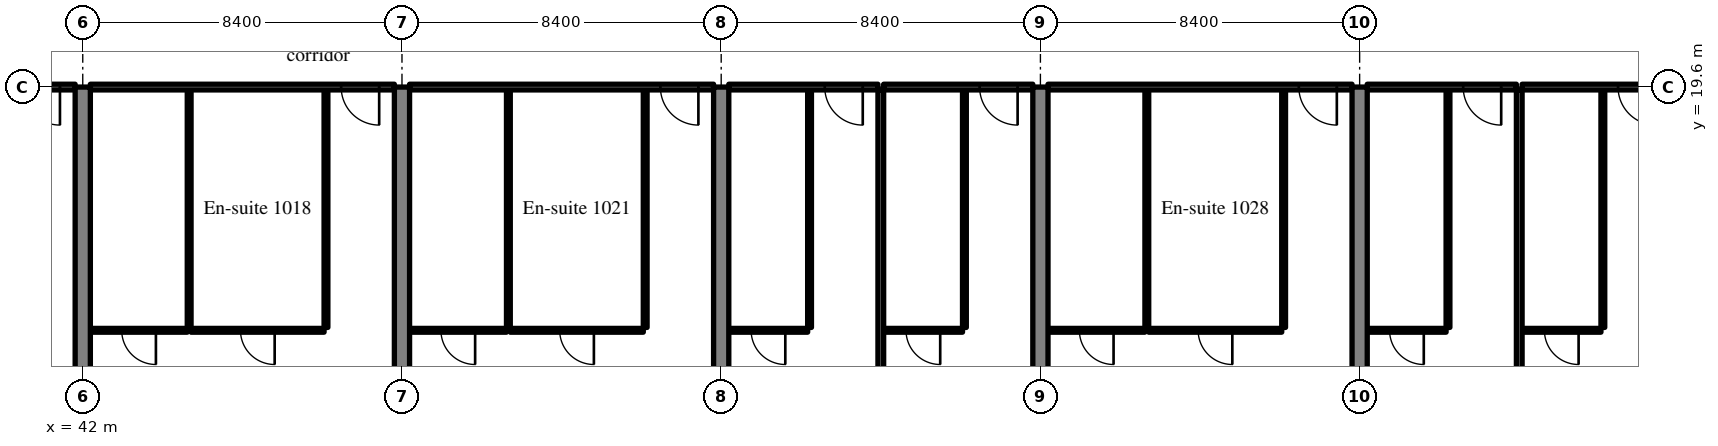
"""IFC4 building model, lengths in metres.
Left out: names, types, materials, properties, quantities, classifications, styles, units other than length and angle.
Written with IfcOpenShell. Run it as: python <this file> out.ifc"""

import sys

from ifc_helpers import new_model, si_unit, direction, frame, frame_2d, origin, place, context, subcontext, project, spatial, rectangle, extrude, source, transform, mapped, element, fill, save


model = new_model("IFC4")
c1 = context("Model", 3, precision=1e-05, world=origin(), true_north=direction((0.0, 1.0)))
c2 = subcontext(c1, "Body", "Model", "MODEL_VIEW")
j1 = project(units=[si_unit("LENGTHUNIT", "METRE"), si_unit("PLANEANGLEUNIT", "RADIAN")], contexts=[c1])
p1 = place(None, origin())
s1 = spatial("IfcSite", under=j1, at=p1, CompositionType="ELEMENT")
p2 = place(p1, origin())
s2 = spatial("IfcBuilding", under=s1, at=p2, CompositionType="ELEMENT")
p3 = place(p2, frame((0.0, 0.0, 46.8)))
s3 = spatial("IfcBuildingStorey", under=s2, at=p3, CompositionType="ELEMENT", Elevation=46.8)
m1 = source(origin(), c2, "Body", "SweptSolid", [
    extrude(rectangle(XDim=19.6, YDim=0.4, at=frame_2d((9.8, 0.0))), origin(), (0.0, 0.0, 1.0), 3.52),
])
p4 = place(p3, frame((42.0, 0.0, 0.0), z_axis=(0.0, 0.0, 1.0), x_axis=(0.0, 1.0, 0.0)))
e1 = element("IfcWall", 1, at=p4, inside=s3, PredefinedType="SHEAR", context=c2, shape_type="MappedRepresentation", body=[
    mapped(m1, transform((0.0, 0.0, 0.0), scale=1.0)),
])
m2 = source(origin(), c2, "Body", "SweptSolid", [
    extrude(rectangle(XDim=18.6, YDim=0.4, at=frame_2d((9.3, 0.0))), origin(), (0.0, 0.0, 1.0), 3.52),
])
p5 = place(p3, frame((50.4, 1.0, 0.0), z_axis=(0.0, 0.0, 1.0), x_axis=(0.0, 1.0, 0.0)))
e2 = element("IfcWall", 2, at=p5, inside=s3, PredefinedType="SHEAR", context=c2, shape_type="MappedRepresentation", body=[
    mapped(m2, transform((0.0, 0.0, 0.0), scale=1.0)),
])
for number, where, z_axis, x_axis in (
    (3, (58.8, 0.0, 0.0), (0.0, 0.0, 1.0), (0.0, 1.0, 0.0)),
    (4, (67.2, 0.0, 0.0), (0.0, 0.0, 1.0), (0.0, 1.0, 0.0)),
    (5, (75.6, 0.0, 0.0), (0.0, 0.0, 1.0), (0.0, 1.0, 0.0)),
):
    element("IfcWall", number, at=place(p3, frame(where, z_axis=z_axis, x_axis=x_axis)), inside=s3, PredefinedType="SHEAR", context=c2, shape_type="MappedRepresentation", body=[
        mapped(m1, transform((0.0, 0.0, 0.0), scale=1.0)),
    ])
m3 = source(origin(), c2, "Body", "SweptSolid", [
    extrude(rectangle(XDim=8.0, YDim=0.15, at=frame_2d((4.0, 0.0))), origin(), (0.0, 0.0, 1.0), 2.82),
])
p6 = place(p3, frame((33.8, 19.6, 0.0), z_axis=(0.0, 0.0, 1.0), x_axis=(1.0, 0.0, 0.0)))
e6 = element("IfcWall", 6, at=p6, inside=s3, PredefinedType="PARTITIONING", context=c2, shape_type="MappedRepresentation", body=[
    mapped(m3, transform((0.0, 0.0, 0.0), scale=1.0)),
])
m4 = source(origin(), c2, "Body", "SweptSolid", [
    extrude(rectangle(XDim=1.0, YDim=2.1, at=frame_2d((0.5, 1.05))), frame((0.0, 0.085, 0.0), z_axis=(0.0, -1.0, 0.0), x_axis=(1.0, 0.0, 0.0)), (0.0, 0.0, 1.0), 0.17),
])
p7 = place(p6, frame((6.6, 0.0, 0.0)))
e7 = element("IfcOpeningElement", 7, at=p7, cuts=e6, PredefinedType="OPENING", context=c2, shape_type="MappedRepresentation", body=[
    mapped(m4, transform((0.0, 0.0, 0.0), scale=1.0)),
])
m5 = source(origin(), c2, "Body", "SweptSolid", [
    extrude(rectangle(XDim=6.25, YDim=0.1, at=frame_2d((3.125, 0.0))), origin(), (0.0, 0.0, 1.0), 3.52),
])
for number, where, z_axis, x_axis in (
    (8, (48.4, 13.275, 0.0), (0.0, 0.0, 1.0), (0.0, 1.0, 0.0)),
    (9, (44.8, 13.275, 0.0), (0.0, 0.0, 1.0), (0.0, 1.0, 0.0)),
):
    element("IfcWall", number, at=place(p3, frame(where, z_axis=z_axis, x_axis=x_axis)), inside=s3, PredefinedType="PARTITIONING", context=c2, shape_type="MappedRepresentation", body=[
        mapped(m5, transform((0.0, 0.0, 0.0), scale=1.0)),
    ])
m6 = source(origin(), c2, "Body", "SweptSolid", [
    extrude(rectangle(XDim=3.5, YDim=0.1, at=frame_2d((1.75, 0.0))), origin(), (0.0, 0.0, 1.0), 3.52),
])
p8 = place(p3, frame((44.85, 13.2, 0.0), z_axis=(0.0, 0.0, 1.0), x_axis=(1.0, 0.0, 0.0)))
e10 = element("IfcWall", 10, at=p8, inside=s3, PredefinedType="PARTITIONING", context=c2, shape_type="MappedRepresentation", body=[
    mapped(m6, transform((0.0, 0.0, 0.0), scale=1.0)),
])
m7 = source(origin(), c2, "Body", "SweptSolid", [
    extrude(rectangle(XDim=0.9, YDim=2.1, at=frame_2d((0.45, 1.05))), frame((0.0, 0.06, 0.0), z_axis=(0.0, -1.0, 0.0), x_axis=(1.0, 0.0, 0.0)), (0.0, 0.0, 1.0), 0.12),
])
p9 = place(p8, frame((1.3, 0.0, 0.0)))
e11 = element("IfcOpeningElement", 11, at=p9, cuts=e10, PredefinedType="OPENING", context=c2, shape_type="MappedRepresentation", body=[
    mapped(m7, transform((0.0, 0.0, 0.0), scale=1.0)),
])
m8 = source(origin(), c2, "Body", "SweptSolid", [
    extrude(rectangle(XDim=2.55, YDim=0.1, at=frame_2d((1.275, 0.0))), origin(), (0.0, 0.0, 1.0), 3.52),
])
p10 = place(p3, frame((42.2, 13.2, 0.0), z_axis=(0.0, 0.0, 1.0), x_axis=(1.0, 0.0, 0.0)))
e12 = element("IfcWall", 12, at=p10, inside=s3, PredefinedType="PARTITIONING", context=c2, shape_type="MappedRepresentation", body=[
    mapped(m8, transform((0.0, 0.0, 0.0), scale=1.0)),
])
p11 = place(p10, frame((0.825, 0.0, 0.0)))
e13 = element("IfcOpeningElement", 13, at=p11, cuts=e12, PredefinedType="OPENING", context=c2, shape_type="MappedRepresentation", body=[
    mapped(m7, transform((0.0, 0.0, 0.0), scale=1.0)),
])
p12 = place(p3, frame((42.2, 19.6, 0.0), z_axis=(0.0, 0.0, 1.0), x_axis=(1.0, 0.0, 0.0)))
e14 = element("IfcWall", 14, at=p12, inside=s3, PredefinedType="PARTITIONING", context=c2, shape_type="MappedRepresentation", body=[
    mapped(m3, transform((0.0, 0.0, 0.0), scale=1.0)),
])
p13 = place(p12, frame((6.6, 0.0, 0.0)))
e15 = element("IfcOpeningElement", 15, at=p13, cuts=e14, PredefinedType="OPENING", context=c2, shape_type="MappedRepresentation", body=[
    mapped(m4, transform((0.0, 0.0, 0.0), scale=1.0)),
])
for number, where, z_axis, x_axis in (
    (16, (56.8, 13.275, 0.0), (0.0, 0.0, 1.0), (0.0, 1.0, 0.0)),
    (17, (53.2, 13.275, 0.0), (0.0, 0.0, 1.0), (0.0, 1.0, 0.0)),
):
    element("IfcWall", number, at=place(p3, frame(where, z_axis=z_axis, x_axis=x_axis)), inside=s3, PredefinedType="PARTITIONING", context=c2, shape_type="MappedRepresentation", body=[
        mapped(m5, transform((0.0, 0.0, 0.0), scale=1.0)),
    ])
p14 = place(p3, frame((53.25, 13.2, 0.0), z_axis=(0.0, 0.0, 1.0), x_axis=(1.0, 0.0, 0.0)))
e18 = element("IfcWall", 18, at=p14, inside=s3, PredefinedType="PARTITIONING", context=c2, shape_type="MappedRepresentation", body=[
    mapped(m6, transform((0.0, 0.0, 0.0), scale=1.0)),
])
p15 = place(p14, frame((1.3, 0.0, 0.0)))
e19 = element("IfcOpeningElement", 19, at=p15, cuts=e18, PredefinedType="OPENING", context=c2, shape_type="MappedRepresentation", body=[
    mapped(m7, transform((0.0, 0.0, 0.0), scale=1.0)),
])
m9 = source(origin(), c2, "Body", "SweptSolid", [
    extrude(rectangle(XDim=2.55, YDim=0.1, at=frame_2d((1.275, 0.0))), origin(), (0.0, 0.0, 1.0), 3.52),
])
p16 = place(p3, frame((50.6, 13.2, 0.0), z_axis=(0.0, 0.0, 1.0), x_axis=(1.0, 0.0, 0.0)))
e20 = element("IfcWall", 20, at=p16, inside=s3, PredefinedType="PARTITIONING", context=c2, shape_type="MappedRepresentation", body=[
    mapped(m9, transform((0.0, 0.0, 0.0), scale=1.0)),
])
p17 = place(p16, frame((0.825, 0.0, 0.0)))
e21 = element("IfcOpeningElement", 21, at=p17, cuts=e20, PredefinedType="OPENING", context=c2, shape_type="MappedRepresentation", body=[
    mapped(m7, transform((0.0, 0.0, 0.0), scale=1.0)),
])
p18 = place(p3, frame((50.6, 19.6, 0.0), z_axis=(0.0, 0.0, 1.0), x_axis=(1.0, 0.0, 0.0)))
e22 = element("IfcWall", 22, at=p18, inside=s3, PredefinedType="PARTITIONING", context=c2, shape_type="MappedRepresentation", body=[
    mapped(m3, transform((0.0, 0.0, 0.0), scale=1.0)),
])
p19 = place(p18, frame((6.6, 0.0, 0.0)))
e23 = element("IfcOpeningElement", 23, at=p19, cuts=e22, PredefinedType="OPENING", context=c2, shape_type="MappedRepresentation", body=[
    mapped(m4, transform((0.0, 0.0, 0.0), scale=1.0)),
])
p20 = place(p3, frame((61.125, 13.275, 0.0), z_axis=(0.0, 0.0, 1.0), x_axis=(0.0, 1.0, 0.0)))
e24 = element("IfcWall", 24, at=p20, inside=s3, PredefinedType="PARTITIONING", context=c2, shape_type="MappedRepresentation", body=[
    mapped(m5, transform((0.0, 0.0, 0.0), scale=1.0)),
])
m10 = source(origin(), c2, "Body", "SweptSolid", [
    extrude(rectangle(XDim=2.075, YDim=0.1, at=frame_2d((1.038, 0.0))), origin(), (0.0, 0.0, 1.0), 3.52),
])
p21 = place(p3, frame((59.0, 13.2, 0.0), z_axis=(0.0, 0.0, 1.0), x_axis=(1.0, 0.0, 0.0)))
e25 = element("IfcWall", 25, at=p21, inside=s3, PredefinedType="PARTITIONING", context=c2, shape_type="MappedRepresentation", body=[
    mapped(m10, transform((0.0, 0.0, 0.0), scale=1.0)),
])
p22 = place(p21, frame((0.587, 0.0, 0.0)))
e26 = element("IfcOpeningElement", 26, at=p22, cuts=e25, PredefinedType="OPENING", context=c2, shape_type="MappedRepresentation", body=[
    mapped(m7, transform((0.0, 0.0, 0.0), scale=1.0)),
])
m11 = source(origin(), c2, "Body", "SweptSolid", [
    extrude(rectangle(XDim=3.925, YDim=0.15, at=frame_2d((1.962, 0.0))), origin(), (0.0, 0.0, 1.0), 2.82),
])
p23 = place(p3, frame((59.0, 19.6, 0.0), z_axis=(0.0, 0.0, 1.0), x_axis=(1.0, 0.0, 0.0)))
e27 = element("IfcWall", 27, at=p23, inside=s3, PredefinedType="PARTITIONING", context=c2, shape_type="MappedRepresentation", body=[
    mapped(m11, transform((0.0, 0.0, 0.0), scale=1.0)),
])
p24 = place(p23, frame((2.525, 0.0, 0.0)))
e28 = element("IfcOpeningElement", 28, at=p24, cuts=e27, PredefinedType="OPENING", context=c2, shape_type="MappedRepresentation", body=[
    mapped(m4, transform((0.0, 0.0, 0.0), scale=1.0)),
])
p25 = place(p3, frame((65.2, 13.275, 0.0), z_axis=(0.0, 0.0, 1.0), x_axis=(0.0, 1.0, 0.0)))
e29 = element("IfcWall", 29, at=p25, inside=s3, PredefinedType="PARTITIONING", context=c2, shape_type="MappedRepresentation", body=[
    mapped(m5, transform((0.0, 0.0, 0.0), scale=1.0)),
])
p26 = place(p3, frame((63.075, 13.2, 0.0), z_axis=(0.0, 0.0, 1.0), x_axis=(1.0, 0.0, 0.0)))
e30 = element("IfcWall", 30, at=p26, inside=s3, PredefinedType="PARTITIONING", context=c2, shape_type="MappedRepresentation", body=[
    mapped(m10, transform((0.0, 0.0, 0.0), scale=1.0)),
])
p27 = place(p26, frame((0.588, 0.0, 0.0)))
e31 = element("IfcOpeningElement", 31, at=p27, cuts=e30, PredefinedType="OPENING", context=c2, shape_type="MappedRepresentation", body=[
    mapped(m7, transform((0.0, 0.0, 0.0), scale=1.0)),
])
p28 = place(p3, frame((63.075, 19.6, 0.0), z_axis=(0.0, 0.0, 1.0), x_axis=(1.0, 0.0, 0.0)))
e32 = element("IfcWall", 32, at=p28, inside=s3, PredefinedType="PARTITIONING", context=c2, shape_type="MappedRepresentation", body=[
    mapped(m11, transform((0.0, 0.0, 0.0), scale=1.0)),
])
p29 = place(p28, frame((2.525, 0.0, 0.0)))
e33 = element("IfcOpeningElement", 33, at=p29, cuts=e32, PredefinedType="OPENING", context=c2, shape_type="MappedRepresentation", body=[
    mapped(m4, transform((0.0, 0.0, 0.0), scale=1.0)),
])
m12 = source(origin(), c2, "Body", "SweptSolid", [
    extrude(rectangle(XDim=20.998, YDim=0.15, at=frame_2d((10.499, 0.0))), origin(), (0.0, 0.0, 1.0), 3.52),
])
p30 = place(p3, frame((63.0, -1.473, 0.0), z_axis=(0.0, 0.0, 1.0), x_axis=(0.0, 1.0, 0.0)))
e34 = element("IfcWall", 34, at=p30, inside=s3, PredefinedType="PARTITIONING", context=c2, shape_type="MappedRepresentation", body=[
    mapped(m12, transform((0.0, 0.0, 0.0), scale=1.0)),
])
for number, where, z_axis, x_axis in (
    (35, (73.6, 13.275, 0.0), (0.0, 0.0, 1.0), (0.0, 1.0, 0.0)),
    (36, (70.0, 13.275, 0.0), (0.0, 0.0, 1.0), (0.0, 1.0, 0.0)),
):
    element("IfcWall", number, at=place(p3, frame(where, z_axis=z_axis, x_axis=x_axis)), inside=s3, PredefinedType="PARTITIONING", context=c2, shape_type="MappedRepresentation", body=[
        mapped(m5, transform((0.0, 0.0, 0.0), scale=1.0)),
    ])
p31 = place(p3, frame((70.05, 13.2, 0.0), z_axis=(0.0, 0.0, 1.0), x_axis=(1.0, 0.0, 0.0)))
e37 = element("IfcWall", 37, at=p31, inside=s3, PredefinedType="PARTITIONING", context=c2, shape_type="MappedRepresentation", body=[
    mapped(m6, transform((0.0, 0.0, 0.0), scale=1.0)),
])
p32 = place(p31, frame((1.3, 0.0, 0.0)))
e38 = element("IfcOpeningElement", 38, at=p32, cuts=e37, PredefinedType="OPENING", context=c2, shape_type="MappedRepresentation", body=[
    mapped(m7, transform((0.0, 0.0, 0.0), scale=1.0)),
])
p33 = place(p3, frame((67.4, 13.2, 0.0), z_axis=(0.0, 0.0, 1.0), x_axis=(1.0, 0.0, 0.0)))
e39 = element("IfcWall", 39, at=p33, inside=s3, PredefinedType="PARTITIONING", context=c2, shape_type="MappedRepresentation", body=[
    mapped(m8, transform((0.0, 0.0, 0.0), scale=1.0)),
])
p34 = place(p33, frame((0.825, 0.0, 0.0)))
e40 = element("IfcOpeningElement", 40, at=p34, cuts=e39, PredefinedType="OPENING", context=c2, shape_type="MappedRepresentation", body=[
    mapped(m7, transform((0.0, 0.0, 0.0), scale=1.0)),
])
p35 = place(p3, frame((67.4, 19.6, 0.0), z_axis=(0.0, 0.0, 1.0), x_axis=(1.0, 0.0, 0.0)))
e41 = element("IfcWall", 41, at=p35, inside=s3, PredefinedType="PARTITIONING", context=c2, shape_type="MappedRepresentation", body=[
    mapped(m3, transform((0.0, 0.0, 0.0), scale=1.0)),
])
p36 = place(p35, frame((6.6, 0.0, 0.0)))
e42 = element("IfcOpeningElement", 42, at=p36, cuts=e41, PredefinedType="OPENING", context=c2, shape_type="MappedRepresentation", body=[
    mapped(m4, transform((0.0, 0.0, 0.0), scale=1.0)),
])
p37 = place(p3, frame((77.925, 13.275, 0.0), z_axis=(0.0, 0.0, 1.0), x_axis=(0.0, 1.0, 0.0)))
e43 = element("IfcWall", 43, at=p37, inside=s3, PredefinedType="PARTITIONING", context=c2, shape_type="MappedRepresentation", body=[
    mapped(m5, transform((0.0, 0.0, 0.0), scale=1.0)),
])
p38 = place(p3, frame((75.8, 13.2, 0.0), z_axis=(0.0, 0.0, 1.0), x_axis=(1.0, 0.0, 0.0)))
e44 = element("IfcWall", 44, at=p38, inside=s3, PredefinedType="PARTITIONING", context=c2, shape_type="MappedRepresentation", body=[
    mapped(m10, transform((0.0, 0.0, 0.0), scale=1.0)),
])
p39 = place(p38, frame((0.588, 0.0, 0.0)))
e45 = element("IfcOpeningElement", 45, at=p39, cuts=e44, PredefinedType="OPENING", context=c2, shape_type="MappedRepresentation", body=[
    mapped(m7, transform((0.0, 0.0, 0.0), scale=1.0)),
])
p40 = place(p3, frame((75.8, 19.6, 0.0), z_axis=(0.0, 0.0, 1.0), x_axis=(1.0, 0.0, 0.0)))
e46 = element("IfcWall", 46, at=p40, inside=s3, PredefinedType="PARTITIONING", context=c2, shape_type="MappedRepresentation", body=[
    mapped(m11, transform((0.0, 0.0, 0.0), scale=1.0)),
])
p41 = place(p40, frame((2.525, 0.0, 0.0)))
e47 = element("IfcOpeningElement", 47, at=p41, cuts=e46, PredefinedType="OPENING", context=c2, shape_type="MappedRepresentation", body=[
    mapped(m4, transform((0.0, 0.0, 0.0), scale=1.0)),
])
p42 = place(p3, frame((82.0, 13.275, 0.0), z_axis=(0.0, 0.0, 1.0), x_axis=(0.0, 1.0, 0.0)))
e48 = element("IfcWall", 48, at=p42, inside=s3, PredefinedType="PARTITIONING", context=c2, shape_type="MappedRepresentation", body=[
    mapped(m5, transform((0.0, 0.0, 0.0), scale=1.0)),
])
p43 = place(p3, frame((79.875, 13.2, 0.0), z_axis=(0.0, 0.0, 1.0), x_axis=(1.0, 0.0, 0.0)))
e49 = element("IfcWall", 49, at=p43, inside=s3, PredefinedType="PARTITIONING", context=c2, shape_type="MappedRepresentation", body=[
    mapped(m10, transform((0.0, 0.0, 0.0), scale=1.0)),
])
p44 = place(p43, frame((0.587, 0.0, 0.0)))
e50 = element("IfcOpeningElement", 50, at=p44, cuts=e49, PredefinedType="OPENING", context=c2, shape_type="MappedRepresentation", body=[
    mapped(m7, transform((0.0, 0.0, 0.0), scale=1.0)),
])
p45 = place(p3, frame((79.875, 19.6, 0.0), z_axis=(0.0, 0.0, 1.0), x_axis=(1.0, 0.0, 0.0)))
e51 = element("IfcWall", 51, at=p45, inside=s3, PredefinedType="PARTITIONING", context=c2, shape_type="MappedRepresentation", body=[
    mapped(m11, transform((0.0, 0.0, 0.0), scale=1.0)),
])
p46 = place(p45, frame((2.525, 0.0, 0.0)))
e52 = element("IfcOpeningElement", 52, at=p46, cuts=e51, PredefinedType="OPENING", context=c2, shape_type="MappedRepresentation", body=[
    mapped(m4, transform((0.0, 0.0, 0.0), scale=1.0)),
])
m13 = source(origin(), c2, "Body", "SweptSolid", [
    extrude(rectangle(XDim=18.725, YDim=0.15, at=frame_2d((9.362, 0.0))), origin(), (0.0, 0.0, 1.0), 3.52),
])
p47 = place(p3, frame((79.8, 0.8, 0.0), z_axis=(0.0, 0.0, 1.0), x_axis=(0.0, 1.0, 0.0)))
e53 = element("IfcWall", 53, at=p47, inside=s3, PredefinedType="PARTITIONING", context=c2, shape_type="MappedRepresentation", body=[
    mapped(m13, transform((0.0, 0.0, 0.0), scale=1.0)),
])
m14 = source(origin(), c2, "Body", "SweptSolid", [
    extrude(rectangle(XDim=1.0, YDim=2.1, at=frame_2d((0.5, 1.05))), frame((0.0, 0.025, 0.0), z_axis=(0.0, -1.0, 0.0), x_axis=(1.0, 0.0, 0.0)), (0.0, 0.0, 1.0), 0.05),
])
p48 = place(p7, origin())
e54 = element("IfcDoor", 54, at=p48, inside=s3, OperationType="SINGLE_SWING_RIGHT", PredefinedType="DOOR", context=c2, shape_type="MappedRepresentation", body=[
    mapped(m14, transform((0.0, 0.0, 0.0), scale=1.0)),
])
fill(e7, e54)
m15 = source(origin(), c2, "Body", "SweptSolid", [
    extrude(rectangle(XDim=0.9, YDim=2.1, at=frame_2d((0.45, 1.05))), frame((0.0, 0.025, 0.0), z_axis=(0.0, -1.0, 0.0), x_axis=(1.0, 0.0, 0.0)), (0.0, 0.0, 1.0), 0.05),
])
p49 = place(p9, origin())
e55 = element("IfcDoor", 55, at=p49, inside=s3, OperationType="SINGLE_SWING_RIGHT", PredefinedType="DOOR", context=c2, shape_type="MappedRepresentation", body=[
    mapped(m15, transform((0.0, 0.0, 0.0), scale=1.0)),
])
fill(e11, e55)
p50 = place(p11, origin())
e56 = element("IfcDoor", 56, at=p50, inside=s3, OperationType="SINGLE_SWING_RIGHT", PredefinedType="DOOR", context=c2, shape_type="MappedRepresentation", body=[
    mapped(m15, transform((0.0, 0.0, 0.0), scale=1.0)),
])
fill(e13, e56)
p51 = place(p13, origin())
e57 = element("IfcDoor", 57, at=p51, inside=s3, OperationType="SINGLE_SWING_RIGHT", PredefinedType="DOOR", context=c2, shape_type="MappedRepresentation", body=[
    mapped(m14, transform((0.0, 0.0, 0.0), scale=1.0)),
])
fill(e15, e57)
p52 = place(p15, origin())
e58 = element("IfcDoor", 58, at=p52, inside=s3, OperationType="SINGLE_SWING_RIGHT", PredefinedType="DOOR", context=c2, shape_type="MappedRepresentation", body=[
    mapped(m15, transform((0.0, 0.0, 0.0), scale=1.0)),
])
fill(e19, e58)
p53 = place(p17, origin())
e59 = element("IfcDoor", 59, at=p53, inside=s3, OperationType="SINGLE_SWING_RIGHT", PredefinedType="DOOR", context=c2, shape_type="MappedRepresentation", body=[
    mapped(m15, transform((0.0, 0.0, 0.0), scale=1.0)),
])
fill(e21, e59)
p54 = place(p19, origin())
e60 = element("IfcDoor", 60, at=p54, inside=s3, OperationType="SINGLE_SWING_RIGHT", PredefinedType="DOOR", context=c2, shape_type="MappedRepresentation", body=[
    mapped(m14, transform((0.0, 0.0, 0.0), scale=1.0)),
])
fill(e23, e60)
p55 = place(p22, origin())
e61 = element("IfcDoor", 61, at=p55, inside=s3, OperationType="SINGLE_SWING_RIGHT", PredefinedType="DOOR", context=c2, shape_type="MappedRepresentation", body=[
    mapped(m15, transform((0.0, 0.0, 0.0), scale=1.0)),
])
fill(e26, e61)
p56 = place(p24, origin())
e62 = element("IfcDoor", 62, at=p56, inside=s3, OperationType="SINGLE_SWING_RIGHT", PredefinedType="DOOR", context=c2, shape_type="MappedRepresentation", body=[
    mapped(m14, transform((0.0, 0.0, 0.0), scale=1.0)),
])
fill(e28, e62)
p57 = place(p27, origin())
e63 = element("IfcDoor", 63, at=p57, inside=s3, OperationType="SINGLE_SWING_RIGHT", PredefinedType="DOOR", context=c2, shape_type="MappedRepresentation", body=[
    mapped(m15, transform((0.0, 0.0, 0.0), scale=1.0)),
])
fill(e31, e63)
p58 = place(p29, origin())
e64 = element("IfcDoor", 64, at=p58, inside=s3, OperationType="SINGLE_SWING_RIGHT", PredefinedType="DOOR", context=c2, shape_type="MappedRepresentation", body=[
    mapped(m14, transform((0.0, 0.0, 0.0), scale=1.0)),
])
fill(e33, e64)
p59 = place(p32, origin())
e65 = element("IfcDoor", 65, at=p59, inside=s3, OperationType="SINGLE_SWING_RIGHT", PredefinedType="DOOR", context=c2, shape_type="MappedRepresentation", body=[
    mapped(m15, transform((0.0, 0.0, 0.0), scale=1.0)),
])
fill(e38, e65)
p60 = place(p34, origin())
e66 = element("IfcDoor", 66, at=p60, inside=s3, OperationType="SINGLE_SWING_RIGHT", PredefinedType="DOOR", context=c2, shape_type="MappedRepresentation", body=[
    mapped(m15, transform((0.0, 0.0, 0.0), scale=1.0)),
])
fill(e40, e66)
p61 = place(p36, origin())
e67 = element("IfcDoor", 67, at=p61, inside=s3, OperationType="SINGLE_SWING_RIGHT", PredefinedType="DOOR", context=c2, shape_type="MappedRepresentation", body=[
    mapped(m14, transform((0.0, 0.0, 0.0), scale=1.0)),
])
fill(e42, e67)
p62 = place(p39, origin())
e68 = element("IfcDoor", 68, at=p62, inside=s3, OperationType="SINGLE_SWING_RIGHT", PredefinedType="DOOR", context=c2, shape_type="MappedRepresentation", body=[
    mapped(m15, transform((0.0, 0.0, 0.0), scale=1.0)),
])
fill(e45, e68)
p63 = place(p41, origin())
e69 = element("IfcDoor", 69, at=p63, inside=s3, OperationType="SINGLE_SWING_RIGHT", PredefinedType="DOOR", context=c2, shape_type="MappedRepresentation", body=[
    mapped(m14, transform((0.0, 0.0, 0.0), scale=1.0)),
])
fill(e47, e69)
p64 = place(p44, origin())
e70 = element("IfcDoor", 70, at=p64, inside=s3, OperationType="SINGLE_SWING_RIGHT", PredefinedType="DOOR", context=c2, shape_type="MappedRepresentation", body=[
    mapped(m15, transform((0.0, 0.0, 0.0), scale=1.0)),
])
fill(e50, e70)
p65 = place(p46, origin())
e71 = element("IfcDoor", 71, at=p65, inside=s3, OperationType="SINGLE_SWING_RIGHT", PredefinedType="DOOR", context=c2, shape_type="MappedRepresentation", body=[
    mapped(m14, transform((0.0, 0.0, 0.0), scale=1.0)),
])
fill(e52, e71)
save(model, sys.argv[1])
